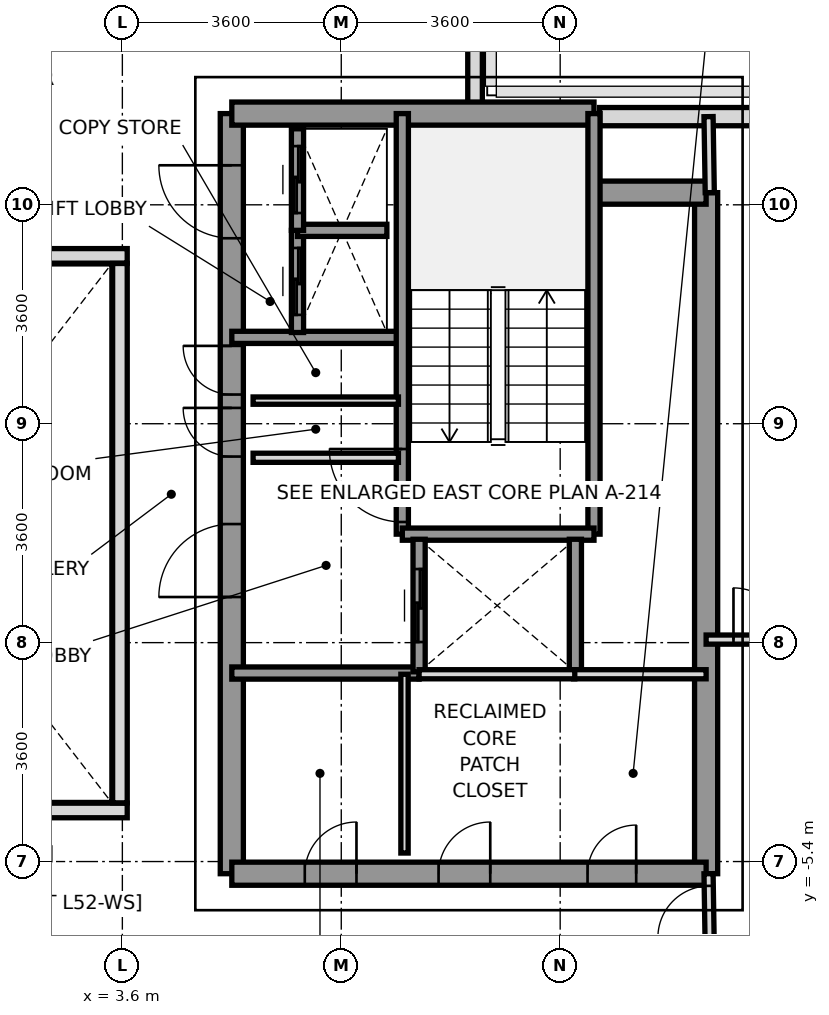
"""IFC4 building model, lengths in metres.
Left out: names, types, materials, properties, quantities, classifications, styles, units other than length and angle.
Written with IfcOpenShell. Run it as: python <this file> out.ifc"""

import sys

from ifc_helpers import new_model, si_unit, direction, frame, frame_2d, origin, place, context, subcontext, project, spatial, rectangle, extrude, source, transform, mapped, element, fill, save


model = new_model("IFC4")
c1 = context("Model", 3, precision=1e-05, world=origin(), true_north=direction((0.0, 1.0)))
c2 = subcontext(c1, "Body", "Model", "MODEL_VIEW")
j1 = project(units=[si_unit("LENGTHUNIT", "METRE"), si_unit("PLANEANGLEUNIT", "RADIAN")], contexts=[c1])
p1 = place(None, origin())
s1 = spatial("IfcSite", under=j1, at=p1, CompositionType="ELEMENT")
p2 = place(p1, origin())
s2 = spatial("IfcBuilding", under=s1, at=p2, CompositionType="ELEMENT")
p3 = place(p2, frame((0.0, 0.0, 191.0)))
s3 = spatial("IfcBuildingStorey", under=s2, at=p3, CompositionType="ELEMENT", Elevation=191.0)
p4 = place(p3, frame((11.448, 6.85, 0.0), z_axis=(0.0, 0.0, 1.0), x_axis=(1.0, 0.0, 0.0)))
e1 = element("IfcWall", 1, at=p4, inside=s3, PredefinedType="SOLIDWALL", context=c2, shape_type="SweptSolid", body=[
    extrude(rectangle(XDim=2.635, YDim=0.3, at=frame_2d((1.317, 0.0))), origin(), (0.0, 0.0, 1.0), 3.2),
])
p5 = place(p3, frame((9.4, 8.547, 0.0), z_axis=(0.0, 0.0, 1.0), x_axis=(0.0, -1.0, 0.0)))
e2 = element("IfcWall", 2, at=p5, inside=s3, PredefinedType="PARAPET", context=c2, shape_type="SweptSolid", body=[
    extrude(rectangle(XDim=1.594, YDim=0.24, at=frame_2d((0.797, 0.0))), origin(), (0.0, 0.0, 1.0), 1.15),
])
p6 = place(p3, frame((13.2, -5.6, 0.0), z_axis=(0.0, 0.0, 1.0), x_axis=(0.0, 1.0, 0.0)))
e3 = element("IfcWall", 3, at=p6, inside=s3, PredefinedType="SHEAR", context=c2, shape_type="SweptSolid", body=[
    extrude(rectangle(XDim=11.2, YDim=0.38, at=frame_2d((5.6, 0.0))), origin(), (0.0, 0.0, 1.0), 3.2),
])
p7 = place(p3, frame((5.4, -5.6, 0.0), z_axis=(0.0, 0.0, 1.0), x_axis=(0.0, 1.0, 0.0)))
e4 = element("IfcWall", 4, at=p7, inside=s3, PredefinedType="SHEAR", context=c2, shape_type="SweptSolid", body=[
    extrude(rectangle(XDim=12.5, YDim=0.38, at=frame_2d((6.25, 0.0))), origin(), (0.0, 0.0, 1.0), 3.2),
])
p8 = place(p7, frame((4.55, 0.0, 0.0)))
e5 = element("IfcOpeningElement", 5, at=p8, cuts=e4, PredefinedType="OPENING", context=c2, shape_type="SweptSolid", body=[
    extrude(rectangle(XDim=1.2, YDim=2.2, at=frame_2d((0.6, 1.1))), frame((0.0, 0.2, 0.0), z_axis=(0.0, -1.0, 0.0), x_axis=(1.0, 0.0, 0.0)), (0.0, 0.0, 1.0), 0.4),
])
p9 = place(p7, frame((10.45, 0.0, 0.0)))
e6 = element("IfcOpeningElement", 6, at=p9, cuts=e4, PredefinedType="OPENING", context=c2, shape_type="SweptSolid", body=[
    extrude(rectangle(XDim=1.2, YDim=2.2, at=frame_2d((0.6, 1.1))), frame((0.0, 0.2, 0.0), z_axis=(0.0, -1.0, 0.0), x_axis=(1.0, 0.0, 0.0)), (0.0, 0.0, 1.0), 0.4),
])
p10 = place(p7, frame((6.86, 0.0, 0.0)))
e7 = element("IfcOpeningElement", 7, at=p10, cuts=e4, PredefinedType="OPENING", context=c2, shape_type="SweptSolid", body=[
    extrude(rectangle(XDim=0.8, YDim=2.1, at=frame_2d((0.4, 1.05))), frame((0.0, 0.2, 0.0), z_axis=(0.0, -1.0, 0.0), x_axis=(1.0, 0.0, 0.0)), (0.0, 0.0, 1.0), 0.4),
])
p11 = place(p7, frame((7.88, 0.0, 0.0)))
e8 = element("IfcOpeningElement", 8, at=p11, cuts=e4, PredefinedType="OPENING", context=c2, shape_type="SweptSolid", body=[
    extrude(rectangle(XDim=0.8, YDim=2.1, at=frame_2d((0.4, 1.05))), frame((0.0, 0.2, 0.0), z_axis=(0.0, -1.0, 0.0), x_axis=(1.0, 0.0, 0.0)), (0.0, 0.0, 1.0), 0.4),
])
p12 = place(p3, frame((5.4, 6.9, 0.0), z_axis=(0.0, 0.0, 1.0), x_axis=(1.0, 0.0, 0.0)))
e9 = element("IfcWall", 9, at=p12, inside=s3, PredefinedType="SHEAR", context=c2, shape_type="SweptSolid", body=[
    extrude(rectangle(XDim=5.956, YDim=0.38, at=frame_2d((2.978, 0.0))), origin(), (0.0, 0.0, 1.0), 3.2),
])
p13 = place(p3, frame((11.356, 5.6, 0.0), z_axis=(0.0, 0.0, 1.0), x_axis=(1.0, 0.0, 0.0)))
e10 = element("IfcWall", 10, at=p13, inside=s3, PredefinedType="SHEAR", context=c2, shape_type="SweptSolid", body=[
    extrude(rectangle(XDim=1.844, YDim=0.38, at=frame_2d((0.922, 0.0))), origin(), (0.0, 0.0, 1.0), 3.2),
])
p14 = place(p3, frame((5.4, -5.6, 0.0), z_axis=(0.0, 0.0, 1.0), x_axis=(1.0, 0.0, 0.0)))
e11 = element("IfcWall", 11, at=p14, inside=s3, PredefinedType="SHEAR", context=c2, shape_type="SweptSolid", body=[
    extrude(rectangle(XDim=7.8, YDim=0.38, at=frame_2d((3.9, 0.0))), origin(), (0.0, 0.0, 1.0), 3.2),
])
p15 = place(p14, frame((5.85, 0.0, 0.0)))
e12 = element("IfcOpeningElement", 12, at=p15, cuts=e11, PredefinedType="OPENING", context=c2, shape_type="SweptSolid", body=[
    extrude(rectangle(XDim=0.8, YDim=2.1, at=frame_2d((0.4, 1.05))), frame((0.0, 0.2, 0.0), z_axis=(0.0, -1.0, 0.0), x_axis=(1.0, 0.0, 0.0)), (0.0, 0.0, 1.0), 0.4),
])
p16 = place(p14, frame((1.2, 0.0, 0.0)))
e13 = element("IfcOpeningElement", 13, at=p16, cuts=e11, PredefinedType="OPENING", context=c2, shape_type="SweptSolid", body=[
    extrude(rectangle(XDim=0.85, YDim=2.1, at=frame_2d((0.425, 1.05))), frame((0.0, 0.2, 0.0), z_axis=(0.0, -1.0, 0.0), x_axis=(1.0, 0.0, 0.0)), (0.0, 0.0, 1.0), 0.4),
])
p17 = place(p14, frame((3.4, 0.0, 0.0)))
e14 = element("IfcOpeningElement", 14, at=p17, cuts=e11, PredefinedType="OPENING", context=c2, shape_type="SweptSolid", body=[
    extrude(rectangle(XDim=0.85, YDim=2.1, at=frame_2d((0.425, 1.05))), frame((0.0, 0.2, 0.0), z_axis=(0.0, -1.0, 0.0), x_axis=(1.0, 0.0, 0.0)), (0.0, 0.0, 1.0), 0.4),
])
p18 = place(p3, frame((5.4, 3.22, 0.0), z_axis=(0.0, 0.0, 1.0), x_axis=(1.0, 0.0, 0.0)))
e15 = element("IfcWall", 15, at=p18, inside=s3, PredefinedType="SOLIDWALL", context=c2, shape_type="SweptSolid", body=[
    extrude(rectangle(XDim=2.78, YDim=0.2, at=frame_2d((1.39, 0.0))), origin(), (0.0, 0.0, 1.0), 3.2),
])
p19 = place(p3, frame((5.4, -2.3, 0.0), z_axis=(0.0, 0.0, 1.0), x_axis=(1.0, 0.0, 0.0)))
e16 = element("IfcWall", 16, at=p19, inside=s3, PredefinedType="SOLIDWALL", context=c2, shape_type="SweptSolid", body=[
    extrude(rectangle(XDim=3.08, YDim=0.2, at=frame_2d((1.54, 0.0))), origin(), (0.0, 0.0, 1.0), 3.2),
])
p20 = place(p3, frame((8.204, -0.016, 0.0), z_axis=(0.0, 0.0, 1.0), x_axis=(0.0, 1.0, 0.0)))
e17 = element("IfcWall", 17, at=p20, inside=s3, PredefinedType="SOLIDWALL", context=c2, shape_type="SweptSolid", body=[
    extrude(rectangle(XDim=6.916, YDim=0.2, at=frame_2d((3.458, 0.0))), origin(), (0.0, 0.0, 1.0), 3.2),
])
p21 = place(p20, frame((0.2, 0.0, 0.0)))
e18 = element("IfcOpeningElement", 18, at=p21, cuts=e17, PredefinedType="OPENING", context=c2, shape_type="SweptSolid", body=[
    extrude(rectangle(XDim=1.2, YDim=2.2, at=frame_2d((0.6, 1.1))), frame((0.0, 0.11, 0.0), z_axis=(0.0, -1.0, 0.0), x_axis=(1.0, 0.0, 0.0)), (0.0, 0.0, 1.0), 0.22),
])
p22 = place(p3, frame((11.356, -0.016, 0.0), z_axis=(0.0, 0.0, 1.0), x_axis=(0.0, 1.0, 0.0)))
e19 = element("IfcWall", 19, at=p22, inside=s3, PredefinedType="SOLIDWALL", context=c2, shape_type="SweptSolid", body=[
    extrude(rectangle(XDim=6.916, YDim=0.2, at=frame_2d((3.458, 0.0))), origin(), (0.0, 0.0, 1.0), 3.2),
])
p23 = place(p3, frame((8.204, -0.016, 0.0), z_axis=(0.0, 0.0, 1.0), x_axis=(1.0, 0.0, 0.0)))
e20 = element("IfcWall", 20, at=p23, inside=s3, PredefinedType="SOLIDWALL", context=c2, shape_type="SweptSolid", body=[
    extrude(rectangle(XDim=3.152, YDim=0.2, at=frame_2d((1.576, 0.0))), origin(), (0.0, 0.0, 1.0), 3.2),
])
p24 = place(p3, frame((8.48, -2.28, 0.0), z_axis=(0.0, 0.0, 1.0), x_axis=(0.0, 1.0, 0.0)))
e21 = element("IfcWall", 21, at=p24, inside=s3, PredefinedType="SOLIDWALL", context=c2, shape_type="SweptSolid", body=[
    extrude(rectangle(XDim=2.18, YDim=0.2, at=frame_2d((1.09, 0.0))), origin(), (0.0, 0.0, 1.0), 3.2),
])
p25 = place(p24, frame((0.49, 0.0, 0.0)))
e22 = element("IfcOpeningElement", 22, at=p25, cuts=e21, PredefinedType="OPENING", context=c2, shape_type="SweptSolid", body=[
    extrude(rectangle(XDim=1.2, YDim=2.2, at=frame_2d((0.6, 1.1))), frame((0.0, 0.11, 0.0), z_axis=(0.0, -1.0, 0.0), x_axis=(1.0, 0.0, 0.0)), (0.0, 0.0, 1.0), 0.22),
])
p26 = place(p3, frame((11.05, -2.28, 0.0), z_axis=(0.0, 0.0, 1.0), x_axis=(0.0, 1.0, 0.0)))
e23 = element("IfcWall", 23, at=p26, inside=s3, PredefinedType="SOLIDWALL", context=c2, shape_type="SweptSolid", body=[
    extrude(rectangle(XDim=2.18, YDim=0.2, at=frame_2d((1.09, 0.0))), origin(), (0.0, 0.0, 1.0), 3.2),
])
p27 = place(p3, frame((6.48, 3.3, 0.0), z_axis=(0.0, 0.0, 1.0), x_axis=(0.0, 1.0, 0.0)))
e24 = element("IfcWall", 24, at=p27, inside=s3, PredefinedType="SOLIDWALL", context=c2, shape_type="SweptSolid", body=[
    extrude(rectangle(XDim=1.68, YDim=0.2, at=frame_2d((0.84, 0.0))), origin(), (0.0, 0.0, 1.0), 3.2),
])
p28 = place(p27, frame((0.29, 0.0, 0.0)))
e25 = element("IfcOpeningElement", 25, at=p28, cuts=e24, PredefinedType="OPENING", context=c2, shape_type="SweptSolid", body=[
    extrude(rectangle(XDim=1.1, YDim=2.2, at=frame_2d((0.55, 1.1))), frame((0.0, 0.11, 0.0), z_axis=(0.0, -1.0, 0.0), x_axis=(1.0, 0.0, 0.0)), (0.0, 0.0, 1.0), 0.22),
])
p29 = place(p3, frame((6.48, 4.98, 0.0), z_axis=(0.0, 0.0, 1.0), x_axis=(1.0, 0.0, 0.0)))
e26 = element("IfcWall", 26, at=p29, inside=s3, PredefinedType="SOLIDWALL", context=c2, shape_type="SweptSolid", body=[
    extrude(rectangle(XDim=1.47, YDim=0.2, at=frame_2d((0.735, 0.0))), origin(), (0.0, 0.0, 1.0), 3.2),
])
p30 = place(p3, frame((6.48, 4.98, 0.0), z_axis=(0.0, 0.0, 1.0), x_axis=(0.0, 1.0, 0.0)))
e27 = element("IfcWall", 27, at=p30, inside=s3, PredefinedType="SOLIDWALL", context=c2, shape_type="SweptSolid", body=[
    extrude(rectangle(XDim=1.67, YDim=0.2, at=frame_2d((0.835, 0.0))), origin(), (0.0, 0.0, 1.0), 3.2),
])
p31 = place(p30, frame((0.285, 0.0, 0.0)))
e28 = element("IfcOpeningElement", 28, at=p31, cuts=e27, PredefinedType="OPENING", context=c2, shape_type="SweptSolid", body=[
    extrude(rectangle(XDim=1.1, YDim=2.2, at=frame_2d((0.55, 1.1))), frame((0.0, 0.11, 0.0), z_axis=(0.0, -1.0, 0.0), x_axis=(1.0, 0.0, 0.0)), (0.0, 0.0, 1.0), 0.22),
])
p32 = place(p3, frame((5.75, 1.24, 0.0), z_axis=(0.0, 0.0, 1.0), x_axis=(1.0, 0.0, 0.0)))
e29 = element("IfcWall", 29, at=p32, inside=s3, PredefinedType="PARTITIONING", context=c2, shape_type="SweptSolid", body=[
    extrude(rectangle(XDim=2.39, YDim=0.15, at=frame_2d((1.195, 0.0))), origin(), (0.0, 0.0, 1.0), 2.3),
])
p33 = place(p3, frame((5.75, 2.18, 0.0), z_axis=(0.0, 0.0, 1.0), x_axis=(1.0, 0.0, 0.0)))
e30 = element("IfcWall", 30, at=p33, inside=s3, PredefinedType="PARTITIONING", context=c2, shape_type="SweptSolid", body=[
    extrude(rectangle(XDim=2.39, YDim=0.12, at=frame_2d((1.195, 0.0))), origin(), (0.0, 0.0, 1.0), 2.3),
])
p34 = place(p3, frame((11.02, -2.32, 0.0), z_axis=(0.0, 0.0, 1.0), x_axis=(1.0, 0.0, 0.0)))
e31 = element("IfcWall", 31, at=p34, inside=s3, PredefinedType="PARTITIONING", context=c2, shape_type="SweptSolid", body=[
    extrude(rectangle(XDim=2.18, YDim=0.15, at=frame_2d((1.09, 0.0))), origin(), (0.0, 0.0, 1.0), 3.2),
])
p35 = place(p3, frame((8.24, -5.26, 0.0), z_axis=(0.0, 0.0, 1.0), x_axis=(0.0, 1.0, 0.0)))
e32 = element("IfcWall", 32, at=p35, inside=s3, PredefinedType="PARTITIONING", context=c2, shape_type="SweptSolid", body=[
    extrude(rectangle(XDim=2.94, YDim=0.12, at=frame_2d((1.47, 0.0))), origin(), (0.0, 0.0, 1.0), 3.2),
])
p36 = place(p3, frame((8.48, -2.32, 0.0), z_axis=(0.0, 0.0, 1.0), x_axis=(1.0, 0.0, 0.0)))
e33 = element("IfcWall", 33, at=p36, inside=s3, PredefinedType="PARTITIONING", context=c2, shape_type="SweptSolid", body=[
    extrude(rectangle(XDim=2.56, YDim=0.15, at=frame_2d((1.28, 0.0))), origin(), (0.0, 0.0, 1.0), 3.2),
])
p37 = place(p3, frame((13.26, -6.85, 0.0), z_axis=(0.0, 0.0, 1.0), x_axis=(-0.016013571389, 0.999871774545, 0.0)))
e34 = element("IfcWall", 34, at=p37, inside=s3, PredefinedType="PARTITIONING", context=c2, shape_type="SweptSolid", body=[
    extrude(rectangle(XDim=1.25, YDim=0.15, at=frame_2d((0.625, 0.0))), origin(), (0.0, 0.0, 1.0), 3.2),
])
p38 = place(p37, frame((0.2, 0.0, 0.0)))
e35 = element("IfcOpeningElement", 35, at=p38, cuts=e34, PredefinedType="OPENING", context=c2, shape_type="SweptSolid", body=[
    extrude(rectangle(XDim=0.85, YDim=2.1, at=frame_2d((0.425, 1.05))), frame((0.0, 0.085, 0.0), z_axis=(0.0, -1.0, 0.0), x_axis=(1.0, 0.0, 0.0)), (0.0, 0.0, 1.0), 0.17),
])
p39 = place(p3, frame((13.26, 5.6, 0.0), z_axis=(0.0, 0.0, 1.0), x_axis=(-0.016013571389, 0.999871774545, 0.0)))
e36 = element("IfcWall", 36, at=p39, inside=s3, PredefinedType="PARTITIONING", context=c2, shape_type="SweptSolid", body=[
    extrude(rectangle(XDim=1.25, YDim=0.15, at=frame_2d((0.625, 0.0))), origin(), (0.0, 0.0, 1.0), 3.2),
])
p40 = place(p3, frame((13.2, -1.75, 0.0), z_axis=(0.0, 0.0, 1.0), x_axis=(1.0, 0.0, 0.0)))
e37 = element("IfcWall", 37, at=p40, inside=s3, PredefinedType="PARTITIONING", context=c2, shape_type="SweptSolid", body=[
    extrude(rectangle(XDim=4.45, YDim=0.15, at=frame_2d((2.225, 0.0))), origin(), (0.0, 0.0, 1.0), 2.8),
])
p41 = place(p40, frame((0.45, 0.0, 0.0)))
e38 = element("IfcOpeningElement", 38, at=p41, cuts=e37, PredefinedType="OPENING", context=c2, shape_type="SweptSolid", body=[
    extrude(rectangle(XDim=0.85, YDim=2.1, at=frame_2d((0.425, 1.05))), frame((0.0, 0.085, 0.0), z_axis=(0.0, -1.0, 0.0), x_axis=(1.0, 0.0, 0.0)), (0.0, 0.0, 1.0), 0.17),
])
for number, where, z_axis, x_axis in (
    (39, (-3.68, -4.56, 0.0), (0.0, 0.0, 1.0), (1.0, 0.0, 0.0)),
    (40, (-3.68, 4.56, 0.0), (0.0, 0.0, 1.0), (1.0, 0.0, 0.0)),
):
    element("IfcWall", number, at=place(p3, frame(where, z_axis=z_axis, x_axis=x_axis)), inside=s3, PredefinedType="PARAPET", context=c2, shape_type="SweptSolid", body=[
        extrude(rectangle(XDim=7.36, YDim=0.24, at=frame_2d((3.68, 0.0))), origin(), (0.0, 0.0, 1.0), 1.15),
    ])
p42 = place(p3, frame((3.56, -4.435, 0.0), z_axis=(0.0, 0.0, 1.0), x_axis=(0.0, 1.0, 0.0)))
e41 = element("IfcWall", 41, at=p42, inside=s3, PredefinedType="PARAPET", context=c2, shape_type="SweptSolid", body=[
    extrude(rectangle(XDim=8.87, YDim=0.24, at=frame_2d((4.435, 0.0))), origin(), (0.0, 0.0, 1.0), 1.15),
])
m1 = source(origin(), c2, "Body", "SweptSolid", [
    extrude(rectangle(XDim=1.2, YDim=2.2, at=frame_2d((0.6, 1.1))), frame((0.0, 0.025, 0.0), z_axis=(0.0, -1.0, 0.0), x_axis=(1.0, 0.0, 0.0)), (0.0, 0.0, 1.0), 0.05),
])
p43 = place(p21, origin())
e42 = element("IfcDoor", 42, at=p43, inside=s3, OperationType="SINGLE_SWING_RIGHT", PredefinedType="DOOR", context=c2, shape_type="MappedRepresentation", body=[
    mapped(m1, transform((0.0, 0.0, 0.0), x_axis=(1.0, 0.0, 0.0), y_axis=(0.0, 1.0, 0.0), z_axis=(0.0, 0.0, 1.0), scale=1.0)),
])
fill(e18, e42)
p44 = place(p8, origin())
e43 = element("IfcDoor", 43, at=p44, inside=s3, OperationType="SINGLE_SWING_LEFT", PredefinedType="DOOR", context=c2, shape_type="MappedRepresentation", body=[
    mapped(m1, transform((0.0, 0.0, 0.0), x_axis=(1.0, 0.0, 0.0), y_axis=(0.0, 1.0, 0.0), z_axis=(0.0, 0.0, 1.0), scale=1.0)),
])
fill(e5, e43)
p45 = place(p9, origin())
e44 = element("IfcDoor", 44, at=p45, inside=s3, OperationType="SINGLE_SWING_RIGHT", PredefinedType="DOOR", context=c2, shape_type="MappedRepresentation", body=[
    mapped(m1, transform((0.0, 0.0, 0.0), x_axis=(1.0, 0.0, 0.0), y_axis=(0.0, 1.0, 0.0), z_axis=(0.0, 0.0, 1.0), scale=1.0)),
])
fill(e6, e44)
m2 = source(origin(), c2, "Body", "SweptSolid", [
    extrude(rectangle(XDim=0.8, YDim=2.1, at=frame_2d((0.4, 1.05))), frame((0.0, 0.025, 0.0), z_axis=(0.0, -1.0, 0.0), x_axis=(1.0, 0.0, 0.0)), (0.0, 0.0, 1.0), 0.05),
])
p46 = place(p10, origin())
e45 = element("IfcDoor", 45, at=p46, inside=s3, OperationType="SINGLE_SWING_RIGHT", PredefinedType="DOOR", context=c2, shape_type="MappedRepresentation", body=[
    mapped(m2, transform((0.0, 0.0, 0.0), x_axis=(1.0, 0.0, 0.0), y_axis=(0.0, 1.0, 0.0), z_axis=(0.0, 0.0, 1.0), scale=1.0)),
])
fill(e7, e45)
p47 = place(p11, origin())
e46 = element("IfcDoor", 46, at=p47, inside=s3, OperationType="SINGLE_SWING_RIGHT", PredefinedType="DOOR", context=c2, shape_type="MappedRepresentation", body=[
    mapped(m2, transform((0.0, 0.0, 0.0), x_axis=(1.0, 0.0, 0.0), y_axis=(0.0, 1.0, 0.0), z_axis=(0.0, 0.0, 1.0), scale=1.0)),
])
fill(e8, e46)
p48 = place(p15, origin())
e47 = element("IfcDoor", 47, at=p48, inside=s3, OperationType="SINGLE_SWING_RIGHT", PredefinedType="DOOR", context=c2, shape_type="MappedRepresentation", body=[
    mapped(m2, transform((0.0, 0.0, 0.0), x_axis=(1.0, 0.0, 0.0), y_axis=(0.0, 1.0, 0.0), z_axis=(0.0, 0.0, 1.0), scale=1.0)),
])
fill(e12, e47)
m3 = source(origin(), c2, "Body", "SweptSolid", [
    extrude(rectangle(XDim=0.85, YDim=2.1, at=frame_2d((0.425, 1.05))), frame((0.0, 0.025, 0.0), z_axis=(0.0, -1.0, 0.0), x_axis=(1.0, 0.0, 0.0)), (0.0, 0.0, 1.0), 0.05),
])
p49 = place(p16, origin())
e48 = element("IfcDoor", 48, at=p49, inside=s3, OperationType="SINGLE_SWING_RIGHT", PredefinedType="DOOR", context=c2, shape_type="MappedRepresentation", body=[
    mapped(m3, transform((0.0, 0.0, 0.0), x_axis=(1.0, 0.0, 0.0), y_axis=(0.0, 1.0, 0.0), z_axis=(0.0, 0.0, 1.0), scale=1.0)),
])
fill(e13, e48)
p50 = place(p17, origin())
e49 = element("IfcDoor", 49, at=p50, inside=s3, OperationType="SINGLE_SWING_RIGHT", PredefinedType="DOOR", context=c2, shape_type="MappedRepresentation", body=[
    mapped(m3, transform((0.0, 0.0, 0.0), x_axis=(1.0, 0.0, 0.0), y_axis=(0.0, 1.0, 0.0), z_axis=(0.0, 0.0, 1.0), scale=1.0)),
])
fill(e14, e49)
p51 = place(p25, origin())
e50 = element("IfcDoor", 50, at=p51, inside=s3, OperationType="SLIDING_TO_RIGHT", PredefinedType="DOOR", context=c2, shape_type="MappedRepresentation", body=[
    mapped(m1, transform((0.0, 0.0, 0.0), x_axis=(1.0, 0.0, 0.0), y_axis=(0.0, 1.0, 0.0), z_axis=(0.0, 0.0, 1.0), scale=1.0)),
])
fill(e22, e50)
m4 = source(origin(), c2, "Body", "SweptSolid", [
    extrude(rectangle(XDim=1.1, YDim=2.2, at=frame_2d((0.55, 1.1))), frame((0.0, 0.025, 0.0), z_axis=(0.0, -1.0, 0.0), x_axis=(1.0, 0.0, 0.0)), (0.0, 0.0, 1.0), 0.05),
])
p52 = place(p28, origin())
e51 = element("IfcDoor", 51, at=p52, inside=s3, OperationType="SLIDING_TO_LEFT", PredefinedType="DOOR", context=c2, shape_type="MappedRepresentation", body=[
    mapped(m4, transform((0.0, 0.0, 0.0), x_axis=(1.0, 0.0, 0.0), y_axis=(0.0, 1.0, 0.0), z_axis=(0.0, 0.0, 1.0), scale=1.0)),
])
fill(e25, e51)
p53 = place(p31, origin())
e52 = element("IfcDoor", 52, at=p53, inside=s3, OperationType="SLIDING_TO_LEFT", PredefinedType="DOOR", context=c2, shape_type="MappedRepresentation", body=[
    mapped(m4, transform((0.0, 0.0, 0.0), x_axis=(1.0, 0.0, 0.0), y_axis=(0.0, 1.0, 0.0), z_axis=(0.0, 0.0, 1.0), scale=1.0)),
])
fill(e28, e52)
p54 = place(p38, origin())
e53 = element("IfcDoor", 53, at=p54, inside=s3, OperationType="SINGLE_SWING_LEFT", PredefinedType="DOOR", context=c2, shape_type="MappedRepresentation", body=[
    mapped(m3, transform((0.0, 0.0, 0.0), x_axis=(1.0, 0.0, 0.0), y_axis=(0.0, 1.0, 0.0), z_axis=(0.0, 0.0, 1.0), scale=1.0)),
])
fill(e35, e53)
p55 = place(p41, origin())
e54 = element("IfcDoor", 54, at=p55, inside=s3, OperationType="SINGLE_SWING_LEFT", PredefinedType="DOOR", context=c2, shape_type="MappedRepresentation", body=[
    mapped(m3, transform((0.0, 0.0, 0.0), x_axis=(1.0, 0.0, 0.0), y_axis=(0.0, 1.0, 0.0), z_axis=(0.0, 0.0, 1.0), scale=1.0)),
])
fill(e38, e54)
save(model, sys.argv[1])
